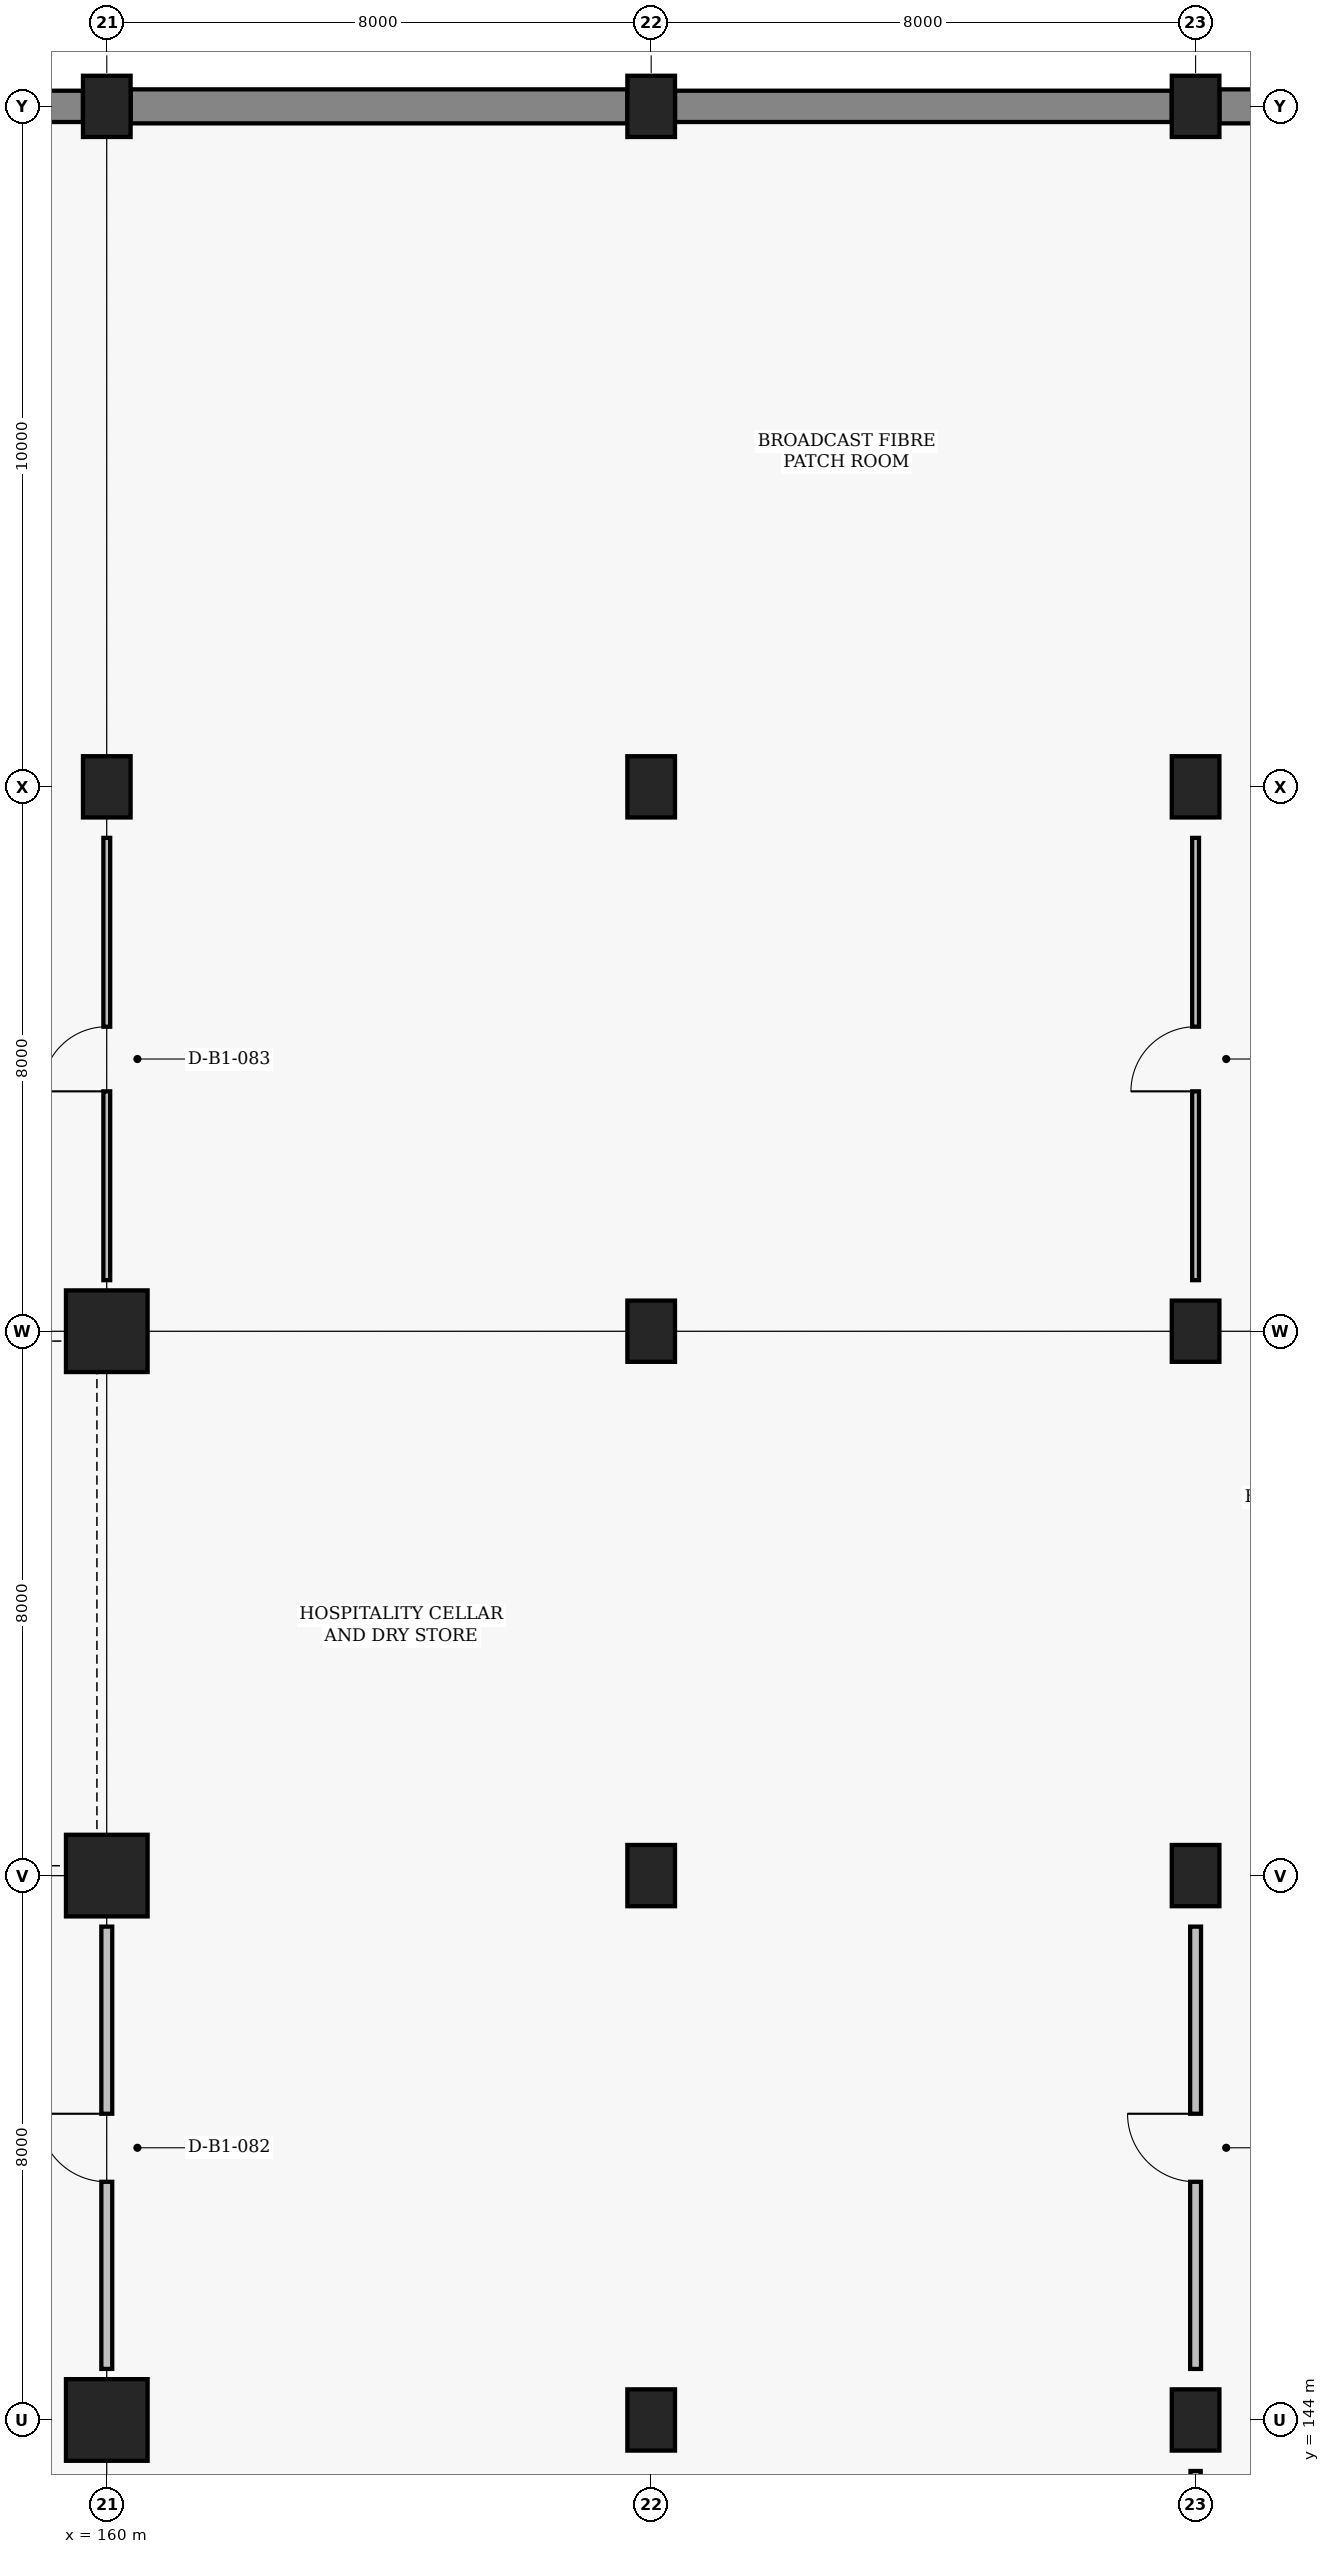
"""IFC4 building model, lengths in metres.
Left out: names, types, materials, properties, quantities, classifications, styles, units other than length and angle.
Written with IfcOpenShell. Run it as: python <this file> out.ifc"""

import sys

from ifc_helpers import new_model, si_unit, direction, frame, frame_2d, origin, origin_2d, place, context, subcontext, project, spatial, rectangle, extrude, element, fill, save


model = new_model("IFC4")
c1 = context("Model", 3, precision=1e-05, world=origin(), true_north=direction((0.0, 1.0)))
c2 = subcontext(c1, "Body", "Model", "MODEL_VIEW")
j1 = project(units=[si_unit("LENGTHUNIT", "METRE"), si_unit("PLANEANGLEUNIT", "RADIAN")], contexts=[c1])
p1 = place(None, origin())
s1 = spatial("IfcSite", under=j1, at=p1, CompositionType="ELEMENT")
p2 = place(p1, origin())
s2 = spatial("IfcBuilding", under=s1, at=p2, CompositionType="ELEMENT")
p3 = place(p2, frame((0.0, 0.0, -5.4)))
s3 = spatial("IfcBuildingStorey", under=s2, at=p3, CompositionType="ELEMENT", Elevation=-5.4)
for number, where, z_axis, x_axis in (
    (1, (160.0, 144.0, 0.0), (0.0, 0.0, 1.0), (1.0, 0.0, 0.0)),
    (2, (160.0, 152.0, 0.0), (0.0, 0.0, 1.0), (1.0, 0.0, 0.0)),
    (3, (160.0, 160.0, 0.0), (0.0, 0.0, 1.0), (1.0, 0.0, 0.0)),
):
    element("IfcColumn", number, at=place(p3, frame(where, z_axis=z_axis, x_axis=x_axis)), inside=s3, PredefinedType="COLUMN", context=c2, shape_type="SweptSolid", body=[
        extrude(rectangle(XDim=1.2, YDim=1.2, at=origin_2d()), origin(), (0.0, 0.0, 1.0), 5.4),
    ])
for number, where, z_axis, x_axis in (
    (4, (160.0, 168.0, 0.0), (0.0, 0.0, 1.0), (1.0, 0.0, 0.0)),
    (5, (160.0, 178.0, 0.0), (0.0, 0.0, 1.0), (1.0, 0.0, 0.0)),
    (6, (168.0, 144.0, 0.0), (0.0, 0.0, 1.0), (1.0, 0.0, 0.0)),
    (7, (168.0, 152.0, 0.0), (0.0, 0.0, 1.0), (1.0, 0.0, 0.0)),
    (8, (168.0, 160.0, 0.0), (0.0, 0.0, 1.0), (1.0, 0.0, 0.0)),
    (9, (168.0, 168.0, 0.0), (0.0, 0.0, 1.0), (1.0, 0.0, 0.0)),
    (10, (168.0, 178.0, 0.0), (0.0, 0.0, 1.0), (1.0, 0.0, 0.0)),
    (11, (176.0, 144.0, 0.0), (0.0, 0.0, 1.0), (1.0, 0.0, 0.0)),
    (12, (176.0, 152.0, 0.0), (0.0, 0.0, 1.0), (1.0, 0.0, 0.0)),
    (13, (176.0, 160.0, 0.0), (0.0, 0.0, 1.0), (1.0, 0.0, 0.0)),
    (14, (176.0, 168.0, 0.0), (0.0, 0.0, 1.0), (1.0, 0.0, 0.0)),
    (15, (176.0, 178.0, 0.0), (0.0, 0.0, 1.0), (1.0, 0.0, 0.0)),
):
    element("IfcColumn", number, at=place(p3, frame(where, z_axis=z_axis, x_axis=x_axis)), inside=s3, PredefinedType="COLUMN", context=c2, shape_type="SweptSolid", body=[
        extrude(rectangle(XDim=0.7, YDim=0.9, at=origin_2d()), origin(), (0.0, 0.0, 1.0), 5.4),
    ])
p4 = place(p3, frame((152.35, 178.0, 0.0), z_axis=(0.0, 0.0, 1.0), x_axis=(1.0, 0.0, 0.0)))
e16 = element("IfcWall", 16, at=p4, inside=s3, PredefinedType="STANDARD", context=c2, shape_type="SweptSolid", body=[
    extrude(rectangle(XDim=7.3, YDim=0.46, at=frame_2d((3.65, 0.0))), origin(), (0.0, 0.0, 1.0), 4.29),
])
p5 = place(p3, frame((160.35, 178.0, 0.0), z_axis=(0.0, 0.0, 1.0), x_axis=(1.0, 0.0, 0.0)))
e17 = element("IfcWall", 17, at=p5, inside=s3, PredefinedType="STANDARD", context=c2, shape_type="SweptSolid", body=[
    extrude(rectangle(XDim=7.3, YDim=0.5, at=frame_2d((3.65, 0.0))), origin(), (0.0, 0.0, 1.0), 4.29),
])
p6 = place(p3, frame((168.35, 178.0, 0.0), z_axis=(0.0, 0.0, 1.0), x_axis=(1.0, 0.0, 0.0)))
e18 = element("IfcWall", 18, at=p6, inside=s3, PredefinedType="STANDARD", context=c2, shape_type="SweptSolid", body=[
    extrude(rectangle(XDim=7.3, YDim=0.46, at=frame_2d((3.65, 0.0))), origin(), (0.0, 0.0, 1.0), 4.29),
])
p7 = place(p3, frame((176.35, 178.0, 0.0), z_axis=(0.0, 0.0, 1.0), x_axis=(1.0, 0.0, 0.0)))
e19 = element("IfcWall", 19, at=p7, inside=s3, PredefinedType="STANDARD", context=c2, shape_type="SweptSolid", body=[
    extrude(rectangle(XDim=7.3, YDim=0.5, at=frame_2d((3.65, 0.0))), origin(), (0.0, 0.0, 1.0), 4.29),
])
p8 = place(p3, frame((160.0, 144.75, 0.0), z_axis=(0.0, 0.0, 1.0), x_axis=(0.0, 1.0, 0.0)))
e20 = element("IfcWall", 20, at=p8, inside=s3, PredefinedType="PARTITIONING", context=c2, shape_type="SweptSolid", body=[
    extrude(rectangle(XDim=6.5, YDim=0.16, at=frame_2d((3.25, 0.0))), origin(), (0.0, 0.0, 1.0), 4.39),
])
p9 = place(p8, frame((2.75, 0.0, 0.0)))
e21 = element("IfcOpeningElement", 21, at=p9, cuts=e20, PredefinedType="OPENING", context=c2, shape_type="SweptSolid", body=[
    extrude(rectangle(XDim=1.0, YDim=2.1, at=frame_2d((0.5, 1.05))), frame((0.0, 0.09, 0.0), z_axis=(0.0, -1.0, 0.0), x_axis=(1.0, 0.0, 0.0)), (0.0, 0.0, 1.0), 0.18),
])
p10 = place(p3, frame((160.0, 160.75, 0.0), z_axis=(0.0, 0.0, 1.0), x_axis=(0.0, 1.0, 0.0)))
e22 = element("IfcWall", 22, at=p10, inside=s3, PredefinedType="PARTITIONING", context=c2, shape_type="SweptSolid", body=[
    extrude(rectangle(XDim=6.5, YDim=0.1, at=frame_2d((3.25, 0.0))), origin(), (0.0, 0.0, 1.0), 4.39),
])
p11 = place(p10, frame((2.775, 0.0, 0.0)))
e23 = element("IfcOpeningElement", 23, at=p11, cuts=e22, PredefinedType="OPENING", context=c2, shape_type="SweptSolid", body=[
    extrude(rectangle(XDim=0.95, YDim=2.1, at=frame_2d((0.475, 1.05))), frame((0.0, 0.06, 0.0), z_axis=(0.0, -1.0, 0.0), x_axis=(1.0, 0.0, 0.0)), (0.0, 0.0, 1.0), 0.12),
])
p12 = place(p3, frame((176.0, 136.75, 0.0), z_axis=(0.0, 0.0, 1.0), x_axis=(0.0, 1.0, 0.0)))
e24 = element("IfcWall", 24, at=p12, inside=s3, PredefinedType="PARTITIONING", context=c2, shape_type="SweptSolid", body=[
    extrude(rectangle(XDim=6.5, YDim=0.15, at=frame_2d((3.25, 0.0))), origin(), (0.0, 0.0, 1.0), 4.39),
])
p13 = place(p12, frame((2.725, 0.0, 0.0)))
e25 = element("IfcOpeningElement", 25, at=p13, cuts=e24, PredefinedType="OPENING", context=c2, shape_type="SweptSolid", body=[
    extrude(rectangle(XDim=1.05, YDim=2.15, at=frame_2d((0.525, 1.075))), frame((0.0, 0.085, 0.0), z_axis=(0.0, -1.0, 0.0), x_axis=(1.0, 0.0, 0.0)), (0.0, 0.0, 1.0), 0.17),
])
p14 = place(p3, frame((176.0, 144.75, 0.0), z_axis=(0.0, 0.0, 1.0), x_axis=(0.0, 1.0, 0.0)))
e26 = element("IfcWall", 26, at=p14, inside=s3, PredefinedType="PARTITIONING", context=c2, shape_type="SweptSolid", body=[
    extrude(rectangle(XDim=6.5, YDim=0.16, at=frame_2d((3.25, 0.0))), origin(), (0.0, 0.0, 1.0), 4.39),
])
p15 = place(p14, frame((2.75, 0.0, 0.0)))
e27 = element("IfcOpeningElement", 27, at=p15, cuts=e26, PredefinedType="OPENING", context=c2, shape_type="SweptSolid", body=[
    extrude(rectangle(XDim=1.0, YDim=2.1, at=frame_2d((0.5, 1.05))), frame((0.0, 0.09, 0.0), z_axis=(0.0, -1.0, 0.0), x_axis=(1.0, 0.0, 0.0)), (0.0, 0.0, 1.0), 0.18),
])
p16 = place(p3, frame((176.0, 160.75, 0.0), z_axis=(0.0, 0.0, 1.0), x_axis=(0.0, 1.0, 0.0)))
e28 = element("IfcWall", 28, at=p16, inside=s3, PredefinedType="PARTITIONING", context=c2, shape_type="SweptSolid", body=[
    extrude(rectangle(XDim=6.5, YDim=0.1, at=frame_2d((3.25, 0.0))), origin(), (0.0, 0.0, 1.0), 3.69),
])
p17 = place(p16, frame((2.775, 0.0, 0.0)))
e29 = element("IfcOpeningElement", 29, at=p17, cuts=e28, PredefinedType="OPENING", context=c2, shape_type="SweptSolid", body=[
    extrude(rectangle(XDim=0.95, YDim=2.1, at=frame_2d((0.475, 1.05))), frame((0.0, 0.06, 0.0), z_axis=(0.0, -1.0, 0.0), x_axis=(1.0, 0.0, 0.0)), (0.0, 0.0, 1.0), 0.12),
])
p18 = place(p9, origin())
e30 = element("IfcDoor", 30, at=p18, inside=s3, OperationType="SINGLE_SWING_RIGHT", PredefinedType="DOOR", context=c2, shape_type="SweptSolid", body=[
    extrude(rectangle(XDim=1.0, YDim=2.1, at=frame_2d((0.5, 1.05))), frame((0.0, 0.025, 0.0), z_axis=(0.0, -1.0, 0.0), x_axis=(1.0, 0.0, 0.0)), (0.0, 0.0, 1.0), 0.05),
])
fill(e21, e30)
p19 = place(p11, origin())
e31 = element("IfcDoor", 31, at=p19, inside=s3, OperationType="SINGLE_SWING_LEFT", PredefinedType="DOOR", context=c2, shape_type="SweptSolid", body=[
    extrude(rectangle(XDim=0.95, YDim=2.1, at=frame_2d((0.475, 1.05))), frame((0.0, 0.025, 0.0), z_axis=(0.0, -1.0, 0.0), x_axis=(1.0, 0.0, 0.0)), (0.0, 0.0, 1.0), 0.05),
])
fill(e23, e31)
p20 = place(p15, origin())
e32 = element("IfcDoor", 32, at=p20, inside=s3, OperationType="SINGLE_SWING_RIGHT", PredefinedType="DOOR", context=c2, shape_type="SweptSolid", body=[
    extrude(rectangle(XDim=1.0, YDim=2.1, at=frame_2d((0.5, 1.05))), frame((0.0, 0.025, 0.0), z_axis=(0.0, -1.0, 0.0), x_axis=(1.0, 0.0, 0.0)), (0.0, 0.0, 1.0), 0.05),
])
fill(e27, e32)
p21 = place(p17, origin())
e33 = element("IfcDoor", 33, at=p21, inside=s3, OperationType="SINGLE_SWING_LEFT", PredefinedType="DOOR", context=c2, shape_type="SweptSolid", body=[
    extrude(rectangle(XDim=0.95, YDim=2.1, at=frame_2d((0.475, 1.05))), frame((0.0, 0.025, 0.0), z_axis=(0.0, -1.0, 0.0), x_axis=(1.0, 0.0, 0.0)), (0.0, 0.0, 1.0), 0.05),
])
fill(e29, e33)
save(model, sys.argv[1])
